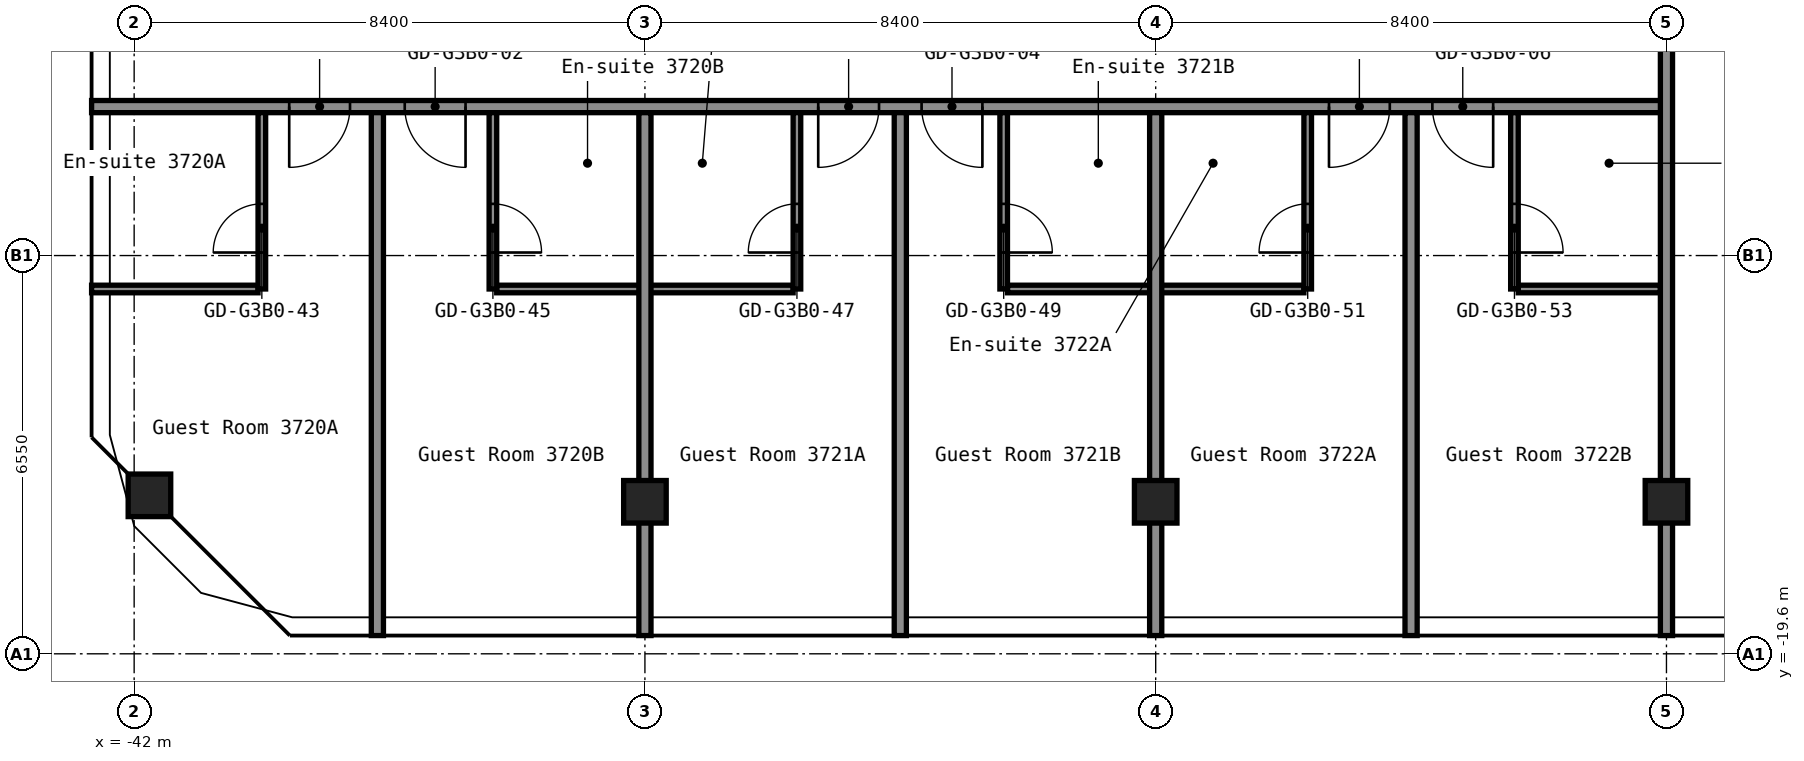
"""IFC4 building model, lengths in metres.
Left out: names, types, materials, properties, quantities, classifications, styles, units other than length and angle.
Written with IfcOpenShell. Run it as: python <this file> out.ifc"""

import sys

from ifc_helpers import new_model, si_unit, direction, frame, frame_2d, origin, origin_2d, place, context, subcontext, project, spatial, rectangle, hollow_rectangle, extrude, element, fill, save


model = new_model("IFC4")
c1 = context("Model", 3, precision=1e-05, world=origin(), true_north=direction((0.0, 1.0)))
c2 = subcontext(c1, "Body", "Model", "MODEL_VIEW")
j1 = project(units=[si_unit("LENGTHUNIT", "METRE"), si_unit("PLANEANGLEUNIT", "RADIAN")], contexts=[c1])
p1 = place(None, origin())
s1 = spatial("IfcSite", under=j1, at=p1, CompositionType="ELEMENT")
p2 = place(p1, origin())
s2 = spatial("IfcBuilding", under=s1, at=p2, CompositionType="ELEMENT")
p3 = place(p2, frame((0.0, 0.0, 134.2)))
s3 = spatial("IfcBuildingStorey", under=s2, at=p3, CompositionType="ELEMENT", Elevation=134.2)
for number, where, z_axis, x_axis in (
    (1, (-41.749, -16.994, 0.0), (0.0, 0.0, 1.0), (1.0, 0.0, 0.0)),
    (2, (-33.6, -17.1, 0.0), (0.0, 0.0, 1.0), (1.0, 0.0, 0.0)),
    (3, (-25.2, -17.1, 0.0), (0.0, 0.0, 1.0), (1.0, 0.0, 0.0)),
    (4, (-16.8, -17.1, 0.0), (0.0, 0.0, 1.0), (1.0, 0.0, 0.0)),
):
    element("IfcColumn", number, at=place(p3, frame(where, z_axis=z_axis, x_axis=x_axis)), inside=s3, PredefinedType="COLUMN", context=c2, shape_type="SweptSolid", body=[
        extrude(hollow_rectangle(XDim=0.7, YDim=0.7, WallThickness=0.028, at=origin_2d()), origin(), (0.0, 0.0, 1.0), 2.75),
    ])
p4 = place(p3, frame((-42.7, -13.6, 0.0), z_axis=(0.0, 0.0, 1.0), x_axis=(1.0, 0.0, 0.0)))
e5 = element("IfcWall", 5, at=p4, inside=s3, PredefinedType="PARTITIONING", context=c2, shape_type="SweptSolid", body=[
    extrude(rectangle(XDim=2.738, YDim=0.125, at=frame_2d((1.369, 0.0))), origin(), (0.0, 0.0, 1.0), 2.75),
])
for number, where, z_axis, x_axis in (
    (6, (-36.038, -13.6, 0.0), (0.0, 0.0, 1.0), (1.0, 0.0, 0.0)),
    (7, (-27.637, -13.6, 0.0), (0.0, 0.0, 1.0), (1.0, 0.0, 0.0)),
):
    element("IfcWall", number, at=place(p3, frame(where, z_axis=z_axis, x_axis=x_axis)), inside=s3, PredefinedType="PARTITIONING", context=c2, shape_type="SweptSolid", body=[
        extrude(rectangle(XDim=4.875, YDim=0.125, at=frame_2d((2.438, 0.0))), origin(), (0.0, 0.0, 1.0), 2.75),
    ])
p5 = place(p3, frame((-19.238, -13.6, 0.0), z_axis=(0.0, 0.0, 1.0), x_axis=(1.0, 0.0, 0.0)))
e8 = element("IfcWall", 8, at=p5, inside=s3, PredefinedType="PARTITIONING", context=c2, shape_type="SweptSolid", body=[
    extrude(rectangle(XDim=2.338, YDim=0.125, at=frame_2d((1.169, 0.0))), origin(), (0.0, 0.0, 1.0), 2.75),
])
p6 = place(p3, frame((-42.7, -10.6, 0.0), z_axis=(0.0, 0.0, 1.0), x_axis=(1.0, 0.0, 0.0)))
e9 = element("IfcWall", 9, at=p6, inside=s3, PredefinedType="PARTITIONING", context=c2, shape_type="SweptSolid", body=[
    extrude(rectangle(XDim=25.9, YDim=0.2, at=frame_2d((12.95, 0.0))), origin(), (0.0, 0.0, 1.0), 2.75),
])
p7 = place(p6, frame((3.25, 0.0, 0.0)))
e10 = element("IfcOpeningElement", 10, at=p7, cuts=e9, PredefinedType="OPENING", context=c2, shape_type="SweptSolid", body=[
    extrude(rectangle(XDim=1.0, YDim=2.1, at=frame_2d((0.5, 1.05))), frame((0.0, 0.11, 0.0), z_axis=(0.0, -1.0, 0.0), x_axis=(1.0, 0.0, 0.0)), (0.0, 0.0, 1.0), 0.22),
])
p8 = place(p6, frame((5.15, 0.0, 0.0)))
e11 = element("IfcOpeningElement", 11, at=p8, cuts=e9, PredefinedType="OPENING", context=c2, shape_type="SweptSolid", body=[
    extrude(rectangle(XDim=1.0, YDim=2.1, at=frame_2d((0.5, 1.05))), frame((0.0, 0.11, 0.0), z_axis=(0.0, -1.0, 0.0), x_axis=(1.0, 0.0, 0.0)), (0.0, 0.0, 1.0), 0.22),
])
p9 = place(p6, frame((11.95, 0.0, 0.0)))
e12 = element("IfcOpeningElement", 12, at=p9, cuts=e9, PredefinedType="OPENING", context=c2, shape_type="SweptSolid", body=[
    extrude(rectangle(XDim=1.0, YDim=2.1, at=frame_2d((0.5, 1.05))), frame((0.0, 0.11, 0.0), z_axis=(0.0, -1.0, 0.0), x_axis=(1.0, 0.0, 0.0)), (0.0, 0.0, 1.0), 0.22),
])
p10 = place(p6, frame((13.65, 0.0, 0.0)))
e13 = element("IfcOpeningElement", 13, at=p10, cuts=e9, PredefinedType="OPENING", context=c2, shape_type="SweptSolid", body=[
    extrude(rectangle(XDim=1.0, YDim=2.1, at=frame_2d((0.5, 1.05))), frame((0.0, 0.11, 0.0), z_axis=(0.0, -1.0, 0.0), x_axis=(1.0, 0.0, 0.0)), (0.0, 0.0, 1.0), 0.22),
])
p11 = place(p6, frame((20.35, 0.0, 0.0)))
e14 = element("IfcOpeningElement", 14, at=p11, cuts=e9, PredefinedType="OPENING", context=c2, shape_type="SweptSolid", body=[
    extrude(rectangle(XDim=1.0, YDim=2.1, at=frame_2d((0.5, 1.05))), frame((0.0, 0.11, 0.0), z_axis=(0.0, -1.0, 0.0), x_axis=(1.0, 0.0, 0.0)), (0.0, 0.0, 1.0), 0.22),
])
p12 = place(p6, frame((22.05, 0.0, 0.0)))
e15 = element("IfcOpeningElement", 15, at=p12, cuts=e9, PredefinedType="OPENING", context=c2, shape_type="SweptSolid", body=[
    extrude(rectangle(XDim=1.0, YDim=2.1, at=frame_2d((0.5, 1.05))), frame((0.0, 0.11, 0.0), z_axis=(0.0, -1.0, 0.0), x_axis=(1.0, 0.0, 0.0)), (0.0, 0.0, 1.0), 0.22),
])
p13 = place(p3, frame((-39.9, -13.6, 0.0), z_axis=(0.0, 0.0, 1.0), x_axis=(0.0, 1.0, 0.0)))
e16 = element("IfcWall", 16, at=p13, inside=s3, PredefinedType="PARTITIONING", context=c2, shape_type="SweptSolid", body=[
    extrude(rectangle(XDim=2.9, YDim=0.125, at=frame_2d((1.45, 0.0))), origin(), (0.0, 0.0, 1.0), 2.75),
])
p14 = place(p13, frame((0.6, 0.0, 0.0)))
e17 = element("IfcOpeningElement", 17, at=p14, cuts=e16, PredefinedType="OPENING", context=c2, shape_type="SweptSolid", body=[
    extrude(rectangle(XDim=0.8, YDim=2.1, at=frame_2d((0.4, 1.05))), frame((0.0, 0.073, 0.0), z_axis=(0.0, -1.0, 0.0), x_axis=(1.0, 0.0, 0.0)), (0.0, 0.0, 1.0), 0.145),
])
p15 = place(p3, frame((-38.0, -19.3, 0.0), z_axis=(0.0, 0.0, 1.0), x_axis=(0.0, 1.0, 0.0)))
e18 = element("IfcWall", 18, at=p15, inside=s3, PredefinedType="PARTITIONING", context=c2, shape_type="SweptSolid", body=[
    extrude(rectangle(XDim=8.6, YDim=0.2, at=frame_2d((4.3, 0.0))), origin(), (0.0, 0.0, 1.0), 2.75),
])
p16 = place(p3, frame((-36.1, -13.6, 0.0), z_axis=(0.0, 0.0, 1.0), x_axis=(0.0, 1.0, 0.0)))
e19 = element("IfcWall", 19, at=p16, inside=s3, PredefinedType="PARTITIONING", context=c2, shape_type="SweptSolid", body=[
    extrude(rectangle(XDim=2.9, YDim=0.125, at=frame_2d((1.45, 0.0))), origin(), (0.0, 0.0, 1.0), 2.75),
])
p17 = place(p16, frame((0.6, 0.0, 0.0)))
e20 = element("IfcOpeningElement", 20, at=p17, cuts=e19, PredefinedType="OPENING", context=c2, shape_type="SweptSolid", body=[
    extrude(rectangle(XDim=0.8, YDim=2.1, at=frame_2d((0.4, 1.05))), frame((0.0, 0.073, 0.0), z_axis=(0.0, -1.0, 0.0), x_axis=(1.0, 0.0, 0.0)), (0.0, 0.0, 1.0), 0.145),
])
p18 = place(p3, frame((-33.6, -19.3, 0.0), z_axis=(0.0, 0.0, 1.0), x_axis=(0.0, 1.0, 0.0)))
e21 = element("IfcWall", 21, at=p18, inside=s3, PredefinedType="PARTITIONING", context=c2, shape_type="SweptSolid", body=[
    extrude(rectangle(XDim=8.6, YDim=0.2, at=frame_2d((4.3, 0.0))), origin(), (0.0, 0.0, 1.0), 2.75),
])
p19 = place(p3, frame((-31.1, -13.6, 0.0), z_axis=(0.0, 0.0, 1.0), x_axis=(0.0, 1.0, 0.0)))
e22 = element("IfcWall", 22, at=p19, inside=s3, PredefinedType="PARTITIONING", context=c2, shape_type="SweptSolid", body=[
    extrude(rectangle(XDim=2.9, YDim=0.125, at=frame_2d((1.45, 0.0))), origin(), (0.0, 0.0, 1.0), 2.75),
])
p20 = place(p19, frame((0.6, 0.0, 0.0)))
e23 = element("IfcOpeningElement", 23, at=p20, cuts=e22, PredefinedType="OPENING", context=c2, shape_type="SweptSolid", body=[
    extrude(rectangle(XDim=0.8, YDim=2.1, at=frame_2d((0.4, 1.05))), frame((0.0, 0.073, 0.0), z_axis=(0.0, -1.0, 0.0), x_axis=(1.0, 0.0, 0.0)), (0.0, 0.0, 1.0), 0.145),
])
p21 = place(p3, frame((-29.4, -19.3, 0.0), z_axis=(0.0, 0.0, 1.0), x_axis=(0.0, 1.0, 0.0)))
e24 = element("IfcWall", 24, at=p21, inside=s3, PredefinedType="PARTITIONING", context=c2, shape_type="SweptSolid", body=[
    extrude(rectangle(XDim=8.6, YDim=0.2, at=frame_2d((4.3, 0.0))), origin(), (0.0, 0.0, 1.0), 2.75),
])
p22 = place(p3, frame((-27.7, -13.6, 0.0), z_axis=(0.0, 0.0, 1.0), x_axis=(0.0, 1.0, 0.0)))
e25 = element("IfcWall", 25, at=p22, inside=s3, PredefinedType="PARTITIONING", context=c2, shape_type="SweptSolid", body=[
    extrude(rectangle(XDim=2.9, YDim=0.125, at=frame_2d((1.45, 0.0))), origin(), (0.0, 0.0, 1.0), 2.75),
])
p23 = place(p22, frame((0.6, 0.0, 0.0)))
e26 = element("IfcOpeningElement", 26, at=p23, cuts=e25, PredefinedType="OPENING", context=c2, shape_type="SweptSolid", body=[
    extrude(rectangle(XDim=0.8, YDim=2.1, at=frame_2d((0.4, 1.05))), frame((0.0, 0.073, 0.0), z_axis=(0.0, -1.0, 0.0), x_axis=(1.0, 0.0, 0.0)), (0.0, 0.0, 1.0), 0.145),
])
p24 = place(p3, frame((-25.2, -19.3, 0.0), z_axis=(0.0, 0.0, 1.0), x_axis=(0.0, 1.0, 0.0)))
e27 = element("IfcWall", 27, at=p24, inside=s3, PredefinedType="PARTITIONING", context=c2, shape_type="SweptSolid", body=[
    extrude(rectangle(XDim=8.6, YDim=0.2, at=frame_2d((4.3, 0.0))), origin(), (0.0, 0.0, 1.0), 2.75),
])
p25 = place(p3, frame((-22.7, -13.6, 0.0), z_axis=(0.0, 0.0, 1.0), x_axis=(0.0, 1.0, 0.0)))
e28 = element("IfcWall", 28, at=p25, inside=s3, PredefinedType="PARTITIONING", context=c2, shape_type="SweptSolid", body=[
    extrude(rectangle(XDim=2.9, YDim=0.125, at=frame_2d((1.45, 0.0))), origin(), (0.0, 0.0, 1.0), 2.75),
])
p26 = place(p25, frame((0.6, 0.0, 0.0)))
e29 = element("IfcOpeningElement", 29, at=p26, cuts=e28, PredefinedType="OPENING", context=c2, shape_type="SweptSolid", body=[
    extrude(rectangle(XDim=0.8, YDim=2.1, at=frame_2d((0.4, 1.05))), frame((0.0, 0.073, 0.0), z_axis=(0.0, -1.0, 0.0), x_axis=(1.0, 0.0, 0.0)), (0.0, 0.0, 1.0), 0.145),
])
p27 = place(p3, frame((-21.0, -19.3, 0.0), z_axis=(0.0, 0.0, 1.0), x_axis=(0.0, 1.0, 0.0)))
e30 = element("IfcWall", 30, at=p27, inside=s3, PredefinedType="PARTITIONING", context=c2, shape_type="SweptSolid", body=[
    extrude(rectangle(XDim=8.6, YDim=0.2, at=frame_2d((4.3, 0.0))), origin(), (0.0, 0.0, 1.0), 2.75),
])
p28 = place(p3, frame((-19.3, -13.6, 0.0), z_axis=(0.0, 0.0, 1.0), x_axis=(0.0, 1.0, 0.0)))
e31 = element("IfcWall", 31, at=p28, inside=s3, PredefinedType="PARTITIONING", context=c2, shape_type="SweptSolid", body=[
    extrude(rectangle(XDim=2.9, YDim=0.125, at=frame_2d((1.45, 0.0))), origin(), (0.0, 0.0, 1.0), 2.75),
])
p29 = place(p28, frame((0.6, 0.0, 0.0)))
e32 = element("IfcOpeningElement", 32, at=p29, cuts=e31, PredefinedType="OPENING", context=c2, shape_type="SweptSolid", body=[
    extrude(rectangle(XDim=0.8, YDim=2.1, at=frame_2d((0.4, 1.05))), frame((0.0, 0.073, 0.0), z_axis=(0.0, -1.0, 0.0), x_axis=(1.0, 0.0, 0.0)), (0.0, 0.0, 1.0), 0.145),
])
p30 = place(p3, frame((-16.8, -19.3, 0.0), z_axis=(0.0, 0.0, 1.0), x_axis=(0.0, 1.0, 0.0)))
e33 = element("IfcWall", 33, at=p30, inside=s3, PredefinedType="PARTITIONING", context=c2, shape_type="SweptSolid", body=[
    extrude(rectangle(XDim=10.91, YDim=0.2, at=frame_2d((5.455, 0.0))), origin(), (0.0, 0.0, 1.0), 2.75),
])
p31 = place(p7, origin())
e34 = element("IfcDoor", 34, at=p31, inside=s3, OperationType="SINGLE_SWING_LEFT", PredefinedType="DOOR", context=c2, shape_type="SweptSolid", body=[
    extrude(rectangle(XDim=1.0, YDim=2.1, at=frame_2d((0.5, 1.05))), frame((0.0, 0.025, 0.0), z_axis=(0.0, -1.0, 0.0), x_axis=(1.0, 0.0, 0.0)), (0.0, 0.0, 1.0), 0.05),
])
fill(e10, e34)
p32 = place(p8, origin())
e35 = element("IfcDoor", 35, at=p32, inside=s3, OperationType="SINGLE_SWING_RIGHT", PredefinedType="DOOR", context=c2, shape_type="SweptSolid", body=[
    extrude(rectangle(XDim=1.0, YDim=2.1, at=frame_2d((0.5, 1.05))), frame((0.0, 0.025, 0.0), z_axis=(0.0, -1.0, 0.0), x_axis=(1.0, 0.0, 0.0)), (0.0, 0.0, 1.0), 0.05),
])
fill(e11, e35)
p33 = place(p9, origin())
e36 = element("IfcDoor", 36, at=p33, inside=s3, OperationType="SINGLE_SWING_LEFT", PredefinedType="DOOR", context=c2, shape_type="SweptSolid", body=[
    extrude(rectangle(XDim=1.0, YDim=2.1, at=frame_2d((0.5, 1.05))), frame((0.0, 0.025, 0.0), z_axis=(0.0, -1.0, 0.0), x_axis=(1.0, 0.0, 0.0)), (0.0, 0.0, 1.0), 0.05),
])
fill(e12, e36)
p34 = place(p10, origin())
e37 = element("IfcDoor", 37, at=p34, inside=s3, OperationType="SINGLE_SWING_RIGHT", PredefinedType="DOOR", context=c2, shape_type="SweptSolid", body=[
    extrude(rectangle(XDim=1.0, YDim=2.1, at=frame_2d((0.5, 1.05))), frame((0.0, 0.025, 0.0), z_axis=(0.0, -1.0, 0.0), x_axis=(1.0, 0.0, 0.0)), (0.0, 0.0, 1.0), 0.05),
])
fill(e13, e37)
p35 = place(p11, origin())
e38 = element("IfcDoor", 38, at=p35, inside=s3, OperationType="SINGLE_SWING_LEFT", PredefinedType="DOOR", context=c2, shape_type="SweptSolid", body=[
    extrude(rectangle(XDim=1.0, YDim=2.1, at=frame_2d((0.5, 1.05))), frame((0.0, 0.025, 0.0), z_axis=(0.0, -1.0, 0.0), x_axis=(1.0, 0.0, 0.0)), (0.0, 0.0, 1.0), 0.05),
])
fill(e14, e38)
p36 = place(p12, origin())
e39 = element("IfcDoor", 39, at=p36, inside=s3, OperationType="SINGLE_SWING_RIGHT", PredefinedType="DOOR", context=c2, shape_type="SweptSolid", body=[
    extrude(rectangle(XDim=1.0, YDim=2.1, at=frame_2d((0.5, 1.05))), frame((0.0, 0.025, 0.0), z_axis=(0.0, -1.0, 0.0), x_axis=(1.0, 0.0, 0.0)), (0.0, 0.0, 1.0), 0.05),
])
fill(e15, e39)
p37 = place(p14, origin())
e40 = element("IfcDoor", 40, at=p37, inside=s3, OperationType="SINGLE_SWING_RIGHT", PredefinedType="DOOR", context=c2, shape_type="SweptSolid", body=[
    extrude(rectangle(XDim=0.8, YDim=2.1, at=frame_2d((0.4, 1.05))), frame((0.0, 0.025, 0.0), z_axis=(0.0, -1.0, 0.0), x_axis=(1.0, 0.0, 0.0)), (0.0, 0.0, 1.0), 0.05),
])
fill(e17, e40)
p38 = place(p17, origin())
e41 = element("IfcDoor", 41, at=p38, inside=s3, OperationType="SINGLE_SWING_LEFT", PredefinedType="DOOR", context=c2, shape_type="SweptSolid", body=[
    extrude(rectangle(XDim=0.8, YDim=2.1, at=frame_2d((0.4, 1.05))), frame((0.0, 0.025, 0.0), z_axis=(0.0, -1.0, 0.0), x_axis=(1.0, 0.0, 0.0)), (0.0, 0.0, 1.0), 0.05),
])
fill(e20, e41)
p39 = place(p20, origin())
e42 = element("IfcDoor", 42, at=p39, inside=s3, OperationType="SINGLE_SWING_RIGHT", PredefinedType="DOOR", context=c2, shape_type="SweptSolid", body=[
    extrude(rectangle(XDim=0.8, YDim=2.1, at=frame_2d((0.4, 1.05))), frame((0.0, 0.025, 0.0), z_axis=(0.0, -1.0, 0.0), x_axis=(1.0, 0.0, 0.0)), (0.0, 0.0, 1.0), 0.05),
])
fill(e23, e42)
p40 = place(p23, origin())
e43 = element("IfcDoor", 43, at=p40, inside=s3, OperationType="SINGLE_SWING_LEFT", PredefinedType="DOOR", context=c2, shape_type="SweptSolid", body=[
    extrude(rectangle(XDim=0.8, YDim=2.1, at=frame_2d((0.4, 1.05))), frame((0.0, 0.025, 0.0), z_axis=(0.0, -1.0, 0.0), x_axis=(1.0, 0.0, 0.0)), (0.0, 0.0, 1.0), 0.05),
])
fill(e26, e43)
p41 = place(p26, origin())
e44 = element("IfcDoor", 44, at=p41, inside=s3, OperationType="SINGLE_SWING_RIGHT", PredefinedType="DOOR", context=c2, shape_type="SweptSolid", body=[
    extrude(rectangle(XDim=0.8, YDim=2.1, at=frame_2d((0.4, 1.05))), frame((0.0, 0.025, 0.0), z_axis=(0.0, -1.0, 0.0), x_axis=(1.0, 0.0, 0.0)), (0.0, 0.0, 1.0), 0.05),
])
fill(e29, e44)
p42 = place(p29, origin())
e45 = element("IfcDoor", 45, at=p42, inside=s3, OperationType="SINGLE_SWING_LEFT", PredefinedType="DOOR", context=c2, shape_type="SweptSolid", body=[
    extrude(rectangle(XDim=0.8, YDim=2.1, at=frame_2d((0.4, 1.05))), frame((0.0, 0.025, 0.0), z_axis=(0.0, -1.0, 0.0), x_axis=(1.0, 0.0, 0.0)), (0.0, 0.0, 1.0), 0.05),
])
fill(e32, e45)
save(model, sys.argv[1])
